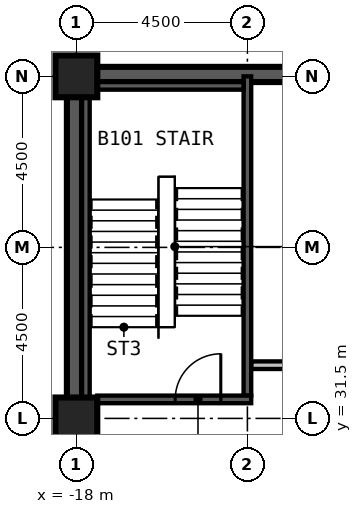
"""IFC4 building model, lengths in metres.
Left out: names, types, materials, properties, quantities, classifications, styles, units other than length and angle.
Written with IfcOpenShell. Run it as: python <this file> out.ifc"""

import sys

from ifc_helpers import new_model, si_unit, direction, frame, frame_2d, origin, origin_2d, place, context, subcontext, project, spatial, rectangle, extrude, element, fill, save


model = new_model("IFC4")
c1 = context("Model", 3, precision=1e-05, world=origin(), true_north=direction((0.0, 1.0)))
c2 = subcontext(c1, "Body", "Model", "MODEL_VIEW")
j1 = project(units=[si_unit("LENGTHUNIT", "METRE"), si_unit("PLANEANGLEUNIT", "RADIAN")], contexts=[c1])
p1 = place(None, origin())
s1 = spatial("IfcSite", under=j1, at=p1, CompositionType="ELEMENT")
p2 = place(p1, origin())
s2 = spatial("IfcBuilding", under=s1, at=p2, CompositionType="ELEMENT")
p3 = place(p2, frame((0.0, 0.0, -4.5)))
s3 = spatial("IfcBuildingStorey", under=s2, at=p3, CompositionType="ELEMENT", Elevation=-4.5)
for number, where, z_axis, x_axis in (
    (1, (-18.0, 31.5, 0.0), (0.0, 0.0, 1.0), (1.0, 0.0, 0.0)),
    (2, (-18.0, 40.5, 0.0), (0.0, 0.0, 1.0), (1.0, 0.0, 0.0)),
):
    element("IfcColumn", number, at=place(p3, frame(where, z_axis=z_axis, x_axis=x_axis)), inside=s3, PredefinedType="COLUMN", context=c2, shape_type="SweptSolid", body=[
        extrude(rectangle(XDim=1.1, YDim=1.1, at=origin_2d()), origin(), (0.0, 0.0, 1.0), 4.5),
    ])
p4 = place(p3, frame((58.75, 40.55, 0.0), z_axis=(0.0, 0.0, 1.0), x_axis=(-1.0, 0.0, 0.0)))
e3 = element("IfcWall", 3, at=p4, inside=s3, PredefinedType="SOLIDWALL", context=c2, shape_type="SweptSolid", body=[
    extrude(rectangle(XDim=77.0, YDim=0.4, at=frame_2d((38.5, 0.0))), origin(), (0.0, 0.0, 1.0), 4.5),
])
p5 = place(p3, frame((-18.05, 40.35, 0.0), z_axis=(0.0, 0.0, 1.0), x_axis=(0.0, -1.0, 0.0)))
e4 = element("IfcWall", 4, at=p5, inside=s3, PredefinedType="SOLIDWALL", context=c2, shape_type="SweptSolid", body=[
    extrude(rectangle(XDim=53.7, YDim=0.4, at=frame_2d((26.85, 0.0))), origin(), (0.0, 0.0, 1.0), 4.5),
])
p6 = place(p3, frame((-17.45, 32.0, 0.0), z_axis=(0.0, 0.0, 1.0), x_axis=(1.0, 0.0, 0.0)))
e5 = element("IfcWall", 5, at=p6, inside=s3, PredefinedType="SOLIDWALL", context=c2, shape_type="SweptSolid", body=[
    extrude(rectangle(XDim=4.05, YDim=0.2, at=frame_2d((2.025, 0.0))), origin(), (0.0, 0.0, 1.0), 2.6),
])
p7 = place(p6, frame((2.05, 0.0, 0.0)))
e6 = element("IfcOpeningElement", 6, at=p7, cuts=e5, PredefinedType="OPENING", context=c2, shape_type="SweptSolid", body=[
    extrude(rectangle(XDim=1.2, YDim=2.1, at=frame_2d((0.6, 1.05))), frame((0.0, 0.11, 0.0), z_axis=(0.0, -1.0, 0.0), x_axis=(1.0, 0.0, 0.0)), (0.0, 0.0, 1.0), 0.22),
])
p8 = place(p3, frame((-13.5, 32.1, 0.0), z_axis=(0.0, 0.0, 1.0), x_axis=(0.0, 1.0, 0.0)))
e7 = element("IfcWall", 7, at=p8, inside=s3, PredefinedType="SOLIDWALL", context=c2, shape_type="SweptSolid", body=[
    extrude(rectangle(XDim=8.4, YDim=0.2, at=frame_2d((4.2, 0.0))), origin(), (0.0, 0.0, 1.0), 4.2),
])
p9 = place(p3, frame((-17.75, 32.05, 0.0), z_axis=(0.0, 0.0, 1.0), x_axis=(0.0, 1.0, 0.0)))
e8 = element("IfcWall", 8, at=p9, inside=s3, PredefinedType="SOLIDWALL", context=c2, shape_type="SweptSolid", body=[
    extrude(rectangle(XDim=7.9, YDim=0.2, at=frame_2d((3.95, 0.0))), origin(), (0.0, 0.0, 1.0), 4.2),
])
p10 = place(p3, frame((-17.45, 40.25, 0.0), z_axis=(0.0, 0.0, 1.0), x_axis=(1.0, 0.0, 0.0)))
e9 = element("IfcWall", 9, at=p10, inside=s3, PredefinedType="SOLIDWALL", context=c2, shape_type="SweptSolid", body=[
    extrude(rectangle(XDim=3.85, YDim=0.2, at=frame_2d((1.925, 0.0))), origin(), (0.0, 0.0, 1.0), 4.2),
])
p11 = place(p3, frame((-13.4, 32.9, 0.0), z_axis=(0.0, 0.0, 1.0), x_axis=(1.0, 0.0, 0.0)))
e10 = element("IfcWall", 10, at=p11, inside=s3, PredefinedType="PARTITIONING", context=c2, shape_type="SweptSolid", body=[
    extrude(rectangle(XDim=63.8, YDim=0.2, at=frame_2d((31.9, 0.0))), origin(), (0.0, 0.0, 1.0), 4.2),
])
p12 = place(p11, frame((1.5, 0.0, 0.0)))
e11 = element("IfcOpeningElement", 11, at=p12, cuts=e10, PredefinedType="OPENING", context=c2, shape_type="SweptSolid", body=[
    extrude(rectangle(XDim=1.0, YDim=2.1, at=frame_2d((0.5, 1.05))), frame((0.0, 0.11, 0.0), z_axis=(0.0, -1.0, 0.0), x_axis=(1.0, 0.0, 0.0)), (0.0, 0.0, 1.0), 0.22),
])
p13 = place(p11, frame((25.3, 0.0, 0.0)))
e12 = element("IfcOpeningElement", 12, at=p13, cuts=e10, PredefinedType="OPENING", context=c2, shape_type="SweptSolid", body=[
    extrude(rectangle(XDim=1.0, YDim=2.1, at=frame_2d((0.5, 1.05))), frame((0.0, 0.11, 0.0), z_axis=(0.0, -1.0, 0.0), x_axis=(1.0, 0.0, 0.0)), (0.0, 0.0, 1.0), 0.22),
])
p14 = place(p11, frame((34.3, 0.0, 0.0)))
e13 = element("IfcOpeningElement", 13, at=p14, cuts=e10, PredefinedType="OPENING", context=c2, shape_type="SweptSolid", body=[
    extrude(rectangle(XDim=1.0, YDim=2.1, at=frame_2d((0.5, 1.05))), frame((0.0, 0.11, 0.0), z_axis=(0.0, -1.0, 0.0), x_axis=(1.0, 0.0, 0.0)), (0.0, 0.0, 1.0), 0.22),
])
p15 = place(p11, frame((43.3, 0.0, 0.0)))
e14 = element("IfcOpeningElement", 14, at=p15, cuts=e10, PredefinedType="OPENING", context=c2, shape_type="SweptSolid", body=[
    extrude(rectangle(XDim=1.0, YDim=2.1, at=frame_2d((0.5, 1.05))), frame((0.0, 0.11, 0.0), z_axis=(0.0, -1.0, 0.0), x_axis=(1.0, 0.0, 0.0)), (0.0, 0.0, 1.0), 0.22),
])
p16 = place(p11, frame((47.8, 0.0, 0.0)))
e15 = element("IfcOpeningElement", 15, at=p16, cuts=e10, PredefinedType="OPENING", context=c2, shape_type="SweptSolid", body=[
    extrude(rectangle(XDim=1.0, YDim=2.1, at=frame_2d((0.5, 1.05))), frame((0.0, 0.11, 0.0), z_axis=(0.0, -1.0, 0.0), x_axis=(1.0, 0.0, 0.0)), (0.0, 0.0, 1.0), 0.22),
])
p17 = place(p11, frame((61.7, 0.0, 0.0)))
e16 = element("IfcOpeningElement", 16, at=p17, cuts=e10, PredefinedType="OPENING", context=c2, shape_type="SweptSolid", body=[
    extrude(rectangle(XDim=1.0, YDim=2.1, at=frame_2d((0.5, 1.05))), frame((0.0, 0.11, 0.0), z_axis=(0.0, -1.0, 0.0), x_axis=(1.0, 0.0, 0.0)), (0.0, 0.0, 1.0), 0.22),
])
p18 = place(p7, origin())
e17 = element("IfcDoor", 17, at=p18, inside=s3, OperationType="SINGLE_SWING_RIGHT", PredefinedType="DOOR", context=c2, shape_type="SweptSolid", body=[
    extrude(rectangle(XDim=1.2, YDim=2.1, at=frame_2d((0.6, 1.05))), frame((0.0, 0.025, 0.0), z_axis=(0.0, -1.0, 0.0), x_axis=(1.0, 0.0, 0.0)), (0.0, 0.0, 1.0), 0.05),
])
fill(e6, e17)
save(model, sys.argv[1])
